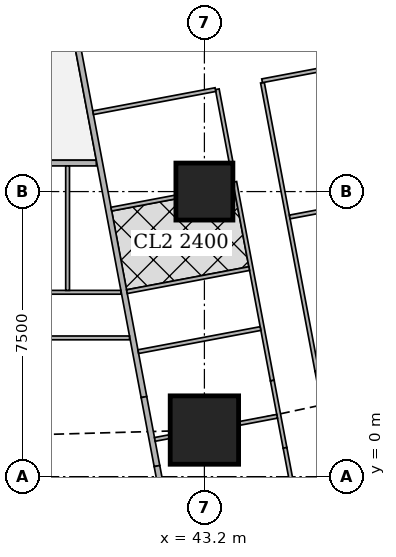
"""IFC4 building model, lengths in metres.
Left out: names, types, materials, properties, quantities, classifications, styles, units other than length and angle.
Written with IfcOpenShell. Run it as: python <this file> out.ifc"""

import sys

from ifc_helpers import new_model, si_unit, direction, frame, frame_2d, origin, origin_2d, place, context, subcontext, project, spatial, rectangle, extrude, element, fill, save


model = new_model("IFC4")
c1 = context("Model", 3, precision=1e-05, world=origin(), true_north=direction((0.0, 1.0)))
c2 = subcontext(c1, "Body", "Model", "MODEL_VIEW")
j1 = project(units=[si_unit("LENGTHUNIT", "METRE"), si_unit("PLANEANGLEUNIT", "RADIAN")], contexts=[c1])
p1 = place(None, origin())
s1 = spatial("IfcSite", under=j1, at=p1, CompositionType="ELEMENT")
p2 = place(p1, origin())
s2 = spatial("IfcBuilding", under=s1, at=p2, CompositionType="ELEMENT")
p3 = place(p2, frame((0.0, 0.0, 147.05)))
s3 = spatial("IfcBuildingStorey", under=s2, at=p3, CompositionType="ELEMENT", Elevation=147.05)
p4 = place(p3, frame((43.2, 1.225, 0.0), z_axis=(0.0, 0.0, 1.0), x_axis=(1.0, 0.0, 0.0)))
e1 = element("IfcColumn", 1, at=p4, inside=s3, PredefinedType="COLUMN", context=c2, shape_type="SweptSolid", body=[
    extrude(rectangle(XDim=1.8, YDim=1.8, at=origin_2d()), origin(), (0.0, 0.0, 1.0), 3.75),
])
p5 = place(p3, frame((43.2, 7.5, 0.0), z_axis=(0.0, 0.0, 1.0), x_axis=(1.0, 0.0, 0.0)))
e2 = element("IfcColumn", 2, at=p5, inside=s3, PredefinedType="COLUMN", context=c2, shape_type="SweptSolid", body=[
    extrude(rectangle(XDim=1.5, YDim=1.5, at=origin_2d()), origin(), (0.0, 0.0, 1.0), 3.75),
])
p6 = place(p3, frame((50.653, 2.703, 0.0), z_axis=(0.0, 0.0, 1.0), x_axis=(-0.185612026696, 0.982623109613, 0.0)))
e3 = element("IfcWall", 3, at=p6, inside=s3, PredefinedType="SOLIDWALL", context=c2, shape_type="SweptSolid", body=[
    extrude(rectangle(XDim=41.393, YDim=0.2, at=frame_2d((20.697, 0.0))), origin(), (0.0, 0.0, 1.0), 3.5),
])
p7 = place(p6, frame((1.633, 0.0, 0.9)))
e4 = element("IfcOpeningElement", 4, at=p7, cuts=e3, PredefinedType="OPENING", context=c2, shape_type="SweptSolid", body=[
    extrude(rectangle(XDim=1.8, YDim=1.5, at=frame_2d((0.9, 0.75))), frame((0.0, 0.11, 0.0), z_axis=(0.0, -1.0, 0.0), x_axis=(1.0, 0.0, 0.0)), (0.0, 0.0, 1.0), 0.22),
])
p8 = place(p6, frame((6.032, 0.0, 0.9)))
e5 = element("IfcOpeningElement", 5, at=p8, cuts=e3, PredefinedType="OPENING", context=c2, shape_type="SweptSolid", body=[
    extrude(rectangle(XDim=1.8, YDim=1.5, at=frame_2d((0.9, 0.75))), frame((0.0, 0.11, 0.0), z_axis=(0.0, -1.0, 0.0), x_axis=(1.0, 0.0, 0.0)), (0.0, 0.0, 1.0), 0.22),
])
p9 = place(p6, frame((9.848, 0.0, 0.9)))
e6 = element("IfcOpeningElement", 6, at=p9, cuts=e3, PredefinedType="OPENING", context=c2, shape_type="SweptSolid", body=[
    extrude(rectangle(XDim=1.8, YDim=1.5, at=frame_2d((0.9, 0.75))), frame((0.0, 0.11, 0.0), z_axis=(0.0, -1.0, 0.0), x_axis=(1.0, 0.0, 0.0)), (0.0, 0.0, 1.0), 0.22),
])
p10 = place(p6, frame((13.664, 0.0, 0.9)))
e7 = element("IfcOpeningElement", 7, at=p10, cuts=e3, PredefinedType="OPENING", context=c2, shape_type="SweptSolid", body=[
    extrude(rectangle(XDim=1.8, YDim=1.5, at=frame_2d((0.9, 0.75))), frame((0.0, 0.11, 0.0), z_axis=(0.0, -1.0, 0.0), x_axis=(1.0, 0.0, 0.0)), (0.0, 0.0, 1.0), 0.22),
])
p11 = place(p6, frame((17.481, 0.0, 0.9)))
e8 = element("IfcOpeningElement", 8, at=p11, cuts=e3, PredefinedType="OPENING", context=c2, shape_type="SweptSolid", body=[
    extrude(rectangle(XDim=1.8, YDim=1.5, at=frame_2d((0.9, 0.75))), frame((0.0, 0.11, 0.0), z_axis=(0.0, -1.0, 0.0), x_axis=(1.0, 0.0, 0.0)), (0.0, 0.0, 1.0), 0.22),
])
p12 = place(p6, frame((21.297, 0.0, 0.9)))
e9 = element("IfcOpeningElement", 9, at=p12, cuts=e3, PredefinedType="OPENING", context=c2, shape_type="SweptSolid", body=[
    extrude(rectangle(XDim=1.8, YDim=1.5, at=frame_2d((0.9, 0.75))), frame((0.0, 0.11, 0.0), z_axis=(0.0, -1.0, 0.0), x_axis=(1.0, 0.0, 0.0)), (0.0, 0.0, 1.0), 0.22),
])
p13 = place(p6, frame((25.113, 0.0, 0.9)))
e10 = element("IfcOpeningElement", 10, at=p13, cuts=e3, PredefinedType="OPENING", context=c2, shape_type="SweptSolid", body=[
    extrude(rectangle(XDim=1.8, YDim=1.5, at=frame_2d((0.9, 0.75))), frame((0.0, 0.11, 0.0), z_axis=(0.0, -1.0, 0.0), x_axis=(1.0, 0.0, 0.0)), (0.0, 0.0, 1.0), 0.22),
])
p14 = place(p6, frame((28.93, 0.0, 0.9)))
e11 = element("IfcOpeningElement", 11, at=p14, cuts=e3, PredefinedType="OPENING", context=c2, shape_type="SweptSolid", body=[
    extrude(rectangle(XDim=1.8, YDim=1.5, at=frame_2d((0.9, 0.75))), frame((0.0, 0.11, 0.0), z_axis=(0.0, -1.0, 0.0), x_axis=(1.0, 0.0, 0.0)), (0.0, 0.0, 1.0), 0.22),
])
p15 = place(p6, frame((32.746, 0.0, 0.9)))
e12 = element("IfcOpeningElement", 12, at=p15, cuts=e3, PredefinedType="OPENING", context=c2, shape_type="SweptSolid", body=[
    extrude(rectangle(XDim=1.8, YDim=1.5, at=frame_2d((0.9, 0.75))), frame((0.0, 0.11, 0.0), z_axis=(0.0, -1.0, 0.0), x_axis=(1.0, 0.0, 0.0)), (0.0, 0.0, 1.0), 0.22),
])
p16 = place(p6, frame((36.481, 0.0, 0.9)))
e13 = element("IfcOpeningElement", 13, at=p16, cuts=e3, PredefinedType="OPENING", context=c2, shape_type="SweptSolid", body=[
    extrude(rectangle(XDim=1.8, YDim=1.5, at=frame_2d((0.9, 0.75))), frame((0.0, 0.11, 0.0), z_axis=(0.0, -1.0, 0.0), x_axis=(1.0, 0.0, 0.0)), (0.0, 0.0, 1.0), 0.22),
])
p17 = place(p3, frame((40.356, 8.25, 0.0), z_axis=(0.0, 0.0, 1.0), x_axis=(-1.0, 0.0, 0.0)))
e14 = element("IfcWall", 14, at=p17, inside=s3, PredefinedType="SOLIDWALL", context=c2, shape_type="SweptSolid", body=[
    extrude(rectangle(XDim=3.605, YDim=0.15, at=frame_2d((1.802, 0.0))), origin(), (0.0, 0.0, 1.0), 3.5),
])
p18 = place(p3, frame((33.877, 43.029, 0.0), z_axis=(0.0, 0.0, 1.0), x_axis=(0.185596841028, -0.98262597798, 0.0)))
e15 = element("IfcWall", 15, at=p18, inside=s3, PredefinedType="SOLIDWALL", context=c2, shape_type="SweptSolid", body=[
    extrude(rectangle(XDim=41.66, YDim=0.15, at=frame_2d((20.83, 0.0))), origin(), (0.0, 0.0, 1.0), 2.5),
])
p19 = place(p18, frame((12.57, 0.0, 0.0)))
e16 = element("IfcOpeningElement", 16, at=p19, cuts=e15, PredefinedType="OPENING", context=c2, shape_type="SweptSolid", body=[
    extrude(rectangle(XDim=1.0, YDim=2.1, at=frame_2d((0.5, 1.05))), frame((0.0, 0.085, 0.0), z_axis=(0.0, -1.0, 0.0), x_axis=(1.0, 0.0, 0.0)), (0.0, 0.0, 1.0), 0.17),
])
p20 = place(p18, frame((16.386, 0.0, 0.0)))
e17 = element("IfcOpeningElement", 17, at=p20, cuts=e15, PredefinedType="OPENING", context=c2, shape_type="SweptSolid", body=[
    extrude(rectangle(XDim=1.0, YDim=2.1, at=frame_2d((0.5, 1.05))), frame((0.0, 0.085, 0.0), z_axis=(0.0, -1.0, 0.0), x_axis=(1.0, 0.0, 0.0)), (0.0, 0.0, 1.0), 0.17),
])
p21 = place(p18, frame((31.166, 0.0, 0.0)))
e18 = element("IfcOpeningElement", 18, at=p21, cuts=e15, PredefinedType="OPENING", context=c2, shape_type="SweptSolid", body=[
    extrude(rectangle(XDim=1.0, YDim=2.1, at=frame_2d((0.5, 1.05))), frame((0.0, 0.085, 0.0), z_axis=(0.0, -1.0, 0.0), x_axis=(1.0, 0.0, 0.0)), (0.0, 0.0, 1.0), 0.17),
])
p22 = place(p3, frame((41.609, 2.093, 0.0), z_axis=(0.0, 0.0, 1.0), x_axis=(0.185708872674, -0.982604811005, 0.0)))
e19 = element("IfcWall", 19, at=p22, inside=s3, PredefinedType="SOLIDWALL", context=c2, shape_type="SweptSolid", body=[
    extrude(rectangle(XDim=1.847, YDim=0.15, at=frame_2d((0.924, 0.0))), origin(), (0.0, 0.0, 1.0), 2.1),
])
p23 = place(p3, frame((41.952, 0.278, 0.0), z_axis=(0.0, 0.0, 1.0), x_axis=(0.185365466984, -0.982669651332, 0.0)))
e20 = element("IfcWall", 20, at=p23, inside=s3, PredefinedType="SOLIDWALL", context=c2, shape_type="SweptSolid", body=[
    extrude(rectangle(XDim=0.944, YDim=0.15, at=frame_2d((0.472, 0.0))), origin(), (0.0, 0.0, 1.0), 3.5),
])
p24 = place(p3, frame((41.229, 3.65, 0.0), z_axis=(0.0, 0.0, 1.0), x_axis=(-1.0, 0.0, 0.0)))
e21 = element("IfcWall", 21, at=p24, inside=s3, PredefinedType="PARTITIONING", context=c2, shape_type="SweptSolid", body=[
    extrude(rectangle(XDim=12.429, YDim=0.1, at=frame_2d((6.214, 0.0))), origin(), (0.0, 0.0, 1.0), 3.5),
])
p25 = place(p24, frame((11.329, 0.0, 0.0)))
e22 = element("IfcOpeningElement", 22, at=p25, cuts=e21, PredefinedType="OPENING", context=c2, shape_type="SweptSolid", body=[
    extrude(rectangle(XDim=0.9, YDim=2.1, at=frame_2d((0.45, 1.05))), frame((0.0, 0.06, 0.0), z_axis=(0.0, -1.0, 0.0), x_axis=(1.0, 0.0, 0.0)), (0.0, 0.0, 1.0), 0.12),
])
p26 = place(p24, frame((7.729, 0.0, 0.0)))
e23 = element("IfcOpeningElement", 23, at=p26, cuts=e21, PredefinedType="OPENING", context=c2, shape_type="SweptSolid", body=[
    extrude(rectangle(XDim=0.9, YDim=2.1, at=frame_2d((0.45, 1.05))), frame((0.0, 0.06, 0.0), z_axis=(0.0, -1.0, 0.0), x_axis=(1.0, 0.0, 0.0)), (0.0, 0.0, 1.0), 0.12),
])
p27 = place(p24, frame((4.129, 0.0, 0.0)))
e24 = element("IfcOpeningElement", 24, at=p27, cuts=e21, PredefinedType="OPENING", context=c2, shape_type="SweptSolid", body=[
    extrude(rectangle(XDim=0.9, YDim=2.1, at=frame_2d((0.45, 1.05))), frame((0.0, 0.06, 0.0), z_axis=(0.0, -1.0, 0.0), x_axis=(1.0, 0.0, 0.0)), (0.0, 0.0, 1.0), 0.12),
])
p28 = place(p3, frame((41.002, 4.85, 0.0), z_axis=(0.0, 0.0, 1.0), x_axis=(-1.0, 0.0, 0.0)))
e25 = element("IfcWall", 25, at=p28, inside=s3, PredefinedType="PARTITIONING", context=c2, shape_type="SweptSolid", body=[
    extrude(rectangle(XDim=12.202, YDim=0.1, at=frame_2d((6.101, 0.0))), origin(), (0.0, 0.0, 1.0), 3.5),
])
p29 = place(p28, frame((10.647, 0.0, 0.0)))
e26 = element("IfcOpeningElement", 26, at=p29, cuts=e25, PredefinedType="OPENING", context=c2, shape_type="SweptSolid", body=[
    extrude(rectangle(XDim=0.9, YDim=2.1, at=frame_2d((0.45, 1.05))), frame((0.0, 0.06, 0.0), z_axis=(0.0, -1.0, 0.0), x_axis=(1.0, 0.0, 0.0)), (0.0, 0.0, 1.0), 0.12),
])
p30 = place(p28, frame((7.352, 0.0, 0.0)))
e27 = element("IfcOpeningElement", 27, at=p30, cuts=e25, PredefinedType="OPENING", context=c2, shape_type="SweptSolid", body=[
    extrude(rectangle(XDim=0.9, YDim=2.1, at=frame_2d((0.45, 1.05))), frame((0.0, 0.06, 0.0), z_axis=(0.0, -1.0, 0.0), x_axis=(1.0, 0.0, 0.0)), (0.0, 0.0, 1.0), 0.12),
])
p31 = place(p28, frame((3.642, 0.0, 0.0)))
e28 = element("IfcOpeningElement", 28, at=p31, cuts=e25, PredefinedType="OPENING", context=c2, shape_type="SweptSolid", body=[
    extrude(rectangle(XDim=0.9, YDim=2.1, at=frame_2d((0.45, 1.05))), frame((0.0, 0.06, 0.0), z_axis=(0.0, -1.0, 0.0), x_axis=(1.0, 0.0, 0.0)), (0.0, 0.0, 1.0), 0.12),
])
p32 = place(p28, frame((0.15, 0.0, 0.0)))
e29 = element("IfcOpeningElement", 29, at=p32, cuts=e25, PredefinedType="OPENING", context=c2, shape_type="SweptSolid", body=[
    extrude(rectangle(XDim=0.9, YDim=2.1, at=frame_2d((0.45, 1.05))), frame((0.0, 0.06, 0.0), z_axis=(0.0, -1.0, 0.0), x_axis=(1.0, 0.0, 0.0)), (0.0, 0.0, 1.0), 0.12),
])
p33 = place(p28, frame((8.847, 0.0, 0.0)))
e30 = element("IfcOpeningElement", 30, at=p33, cuts=e25, PredefinedType="OPENING", context=c2, shape_type="SweptSolid", body=[
    extrude(rectangle(XDim=0.9, YDim=2.1, at=frame_2d((0.45, 1.05))), frame((0.0, 0.06, 0.0), z_axis=(0.0, -1.0, 0.0), x_axis=(1.0, 0.0, 0.0)), (0.0, 0.0, 1.0), 0.12),
])
p34 = place(p28, frame((5.552, 0.0, 0.0)))
e31 = element("IfcOpeningElement", 31, at=p34, cuts=e25, PredefinedType="OPENING", context=c2, shape_type="SweptSolid", body=[
    extrude(rectangle(XDim=0.9, YDim=2.1, at=frame_2d((0.45, 1.05))), frame((0.0, 0.06, 0.0), z_axis=(0.0, -1.0, 0.0), x_axis=(1.0, 0.0, 0.0)), (0.0, 0.0, 1.0), 0.12),
])
p35 = place(p28, frame((1.842, 0.0, 0.0)))
e32 = element("IfcOpeningElement", 32, at=p35, cuts=e25, PredefinedType="OPENING", context=c2, shape_type="SweptSolid", body=[
    extrude(rectangle(XDim=0.9, YDim=2.1, at=frame_2d((0.45, 1.05))), frame((0.0, 0.06, 0.0), z_axis=(0.0, -1.0, 0.0), x_axis=(1.0, 0.0, 0.0)), (0.0, 0.0, 1.0), 0.12),
])
p36 = place(p3, frame((39.6, 4.9, 0.0), z_axis=(0.0, 0.0, 1.0), x_axis=(0.0, 1.0, 0.0)))
e33 = element("IfcWall", 33, at=p36, inside=s3, PredefinedType="PARTITIONING", context=c2, shape_type="SweptSolid", body=[
    extrude(rectangle(XDim=3.275, YDim=0.1, at=frame_2d((1.638, 0.0))), origin(), (0.0, 0.0, 1.0), 3.5),
])
p37 = place(p3, frame((44.727, 10.366, 0.0), z_axis=(0.0, 0.0, 1.0), x_axis=(0.185578957652, -0.982629355595, 0.0)))
e34 = element("IfcWall", 34, at=p37, inside=s3, PredefinedType="PARTITIONING", context=c2, shape_type="SweptSolid", body=[
    extrude(rectangle(XDim=7.721, YDim=0.1, at=frame_2d((3.86, 0.0))), origin(), (0.0, 0.0, 1.0), 3.5),
])
p38 = place(p37, frame((0.151, 0.0, 0.0)))
e35 = element("IfcOpeningElement", 35, at=p38, cuts=e34, PredefinedType="OPENING", context=c2, shape_type="SweptSolid", body=[
    extrude(rectangle(XDim=0.9, YDim=2.1, at=frame_2d((0.45, 1.05))), frame((0.0, 0.06, 0.0), z_axis=(0.0, -1.0, 0.0), x_axis=(1.0, 0.0, 0.0)), (0.0, 0.0, 1.0), 0.12),
])
p39 = place(p37, frame((3.806, 0.0, 0.0)))
e36 = element("IfcOpeningElement", 36, at=p39, cuts=e34, PredefinedType="OPENING", context=c2, shape_type="SweptSolid", body=[
    extrude(rectangle(XDim=0.9, YDim=2.1, at=frame_2d((0.45, 1.05))), frame((0.0, 0.06, 0.0), z_axis=(0.0, -1.0, 0.0), x_axis=(1.0, 0.0, 0.0)), (0.0, 0.0, 1.0), 0.12),
])
p40 = place(p3, frame((46.16, 2.779, 0.0), z_axis=(0.0, 0.0, 1.0), x_axis=(0.18597295662, -0.982554863306, 0.0)))
e37 = element("IfcWall", 37, at=p40, inside=s3, PredefinedType="PARTITIONING", context=c2, shape_type="SweptSolid", body=[
    extrude(rectangle(XDim=1.802, YDim=0.1, at=frame_2d((0.901, 0.0))), origin(), (0.0, 0.0, 1.0), 2.1),
])
p41 = place(p3, frame((43.539, 10.192, 0.0), z_axis=(0.0, 0.0, 1.0), x_axis=(0.18564540894, -0.982616803306, 0.0)))
e38 = element("IfcWall", 38, at=p41, inside=s3, PredefinedType="PARTITIONING", context=c2, shape_type="SweptSolid", body=[
    extrude(rectangle(XDim=1.966, YDim=0.1, at=frame_2d((0.983, 0.0))), origin(), (0.0, 0.0, 1.0), 3.5),
])
p42 = place(p3, frame((43.999, 7.755, 0.0), z_axis=(0.0, 0.0, 1.0), x_axis=(0.185565904578, -0.982631820703, 0.0)))
e39 = element("IfcWall", 39, at=p42, inside=s3, PredefinedType="PARTITIONING", context=c2, shape_type="SweptSolid", body=[
    extrude(rectangle(XDim=5.319, YDim=0.1, at=frame_2d((2.66, 0.0))), origin(), (0.0, 0.0, 1.0), 3.5),
])
p43 = place(p42, frame((1.0, 0.0, 0.0)))
e40 = element("IfcOpeningElement", 40, at=p43, cuts=e39, PredefinedType="OPENING", context=c2, shape_type="SweptSolid", body=[
    extrude(rectangle(XDim=0.9, YDim=2.1, at=frame_2d((0.45, 1.05))), frame((0.0, 0.06, 0.0), z_axis=(0.0, -1.0, 0.0), x_axis=(1.0, 0.0, 0.0)), (0.0, 0.0, 1.0), 0.12),
])
p44 = place(p42, frame((4.269, 0.0, 0.0)))
e41 = element("IfcOpeningElement", 41, at=p44, cuts=e39, PredefinedType="OPENING", context=c2, shape_type="SweptSolid", body=[
    extrude(rectangle(XDim=0.9, YDim=2.1, at=frame_2d((0.45, 1.05))), frame((0.0, 0.06, 0.0), z_axis=(0.0, -1.0, 0.0), x_axis=(1.0, 0.0, 0.0)), (0.0, 0.0, 1.0), 0.12),
])
p45 = place(p42, frame((2.665, 0.0, 0.0)))
e42 = element("IfcOpeningElement", 42, at=p45, cuts=e39, PredefinedType="OPENING", context=c2, shape_type="SweptSolid", body=[
    extrude(rectangle(XDim=0.9, YDim=2.1, at=frame_2d((0.45, 1.05))), frame((0.0, 0.06, 0.0), z_axis=(0.0, -1.0, 0.0), x_axis=(1.0, 0.0, 0.0)), (0.0, 0.0, 1.0), 0.12),
])
p46 = place(p3, frame((44.986, 2.528, 0.0), z_axis=(0.0, 0.0, 1.0), x_axis=(0.18584218627, -0.982579605835, 0.0)))
e43 = element("IfcWall", 43, at=p46, inside=s3, PredefinedType="PARTITIONING", context=c2, shape_type="SweptSolid", body=[
    extrude(rectangle(XDim=1.802, YDim=0.1, at=frame_2d((0.901, 0.0))), origin(), (0.0, 0.0, 1.0), 2.1),
])
p47 = place(p3, frame((45.321, 0.757, 0.0), z_axis=(0.0, 0.0, 1.0), x_axis=(0.185640562635, -0.982617718904, 0.0)))
e44 = element("IfcWall", 44, at=p47, inside=s3, PredefinedType="PARTITIONING", context=c2, shape_type="SweptSolid", body=[
    extrude(rectangle(XDim=1.395, YDim=0.1, at=frame_2d((0.698, 0.0))), origin(), (0.0, 0.0, 1.0), 3.5),
])
p48 = place(p47, frame((0.15, 0.0, 0.0)))
e45 = element("IfcOpeningElement", 45, at=p48, cuts=e44, PredefinedType="OPENING", context=c2, shape_type="SweptSolid", body=[
    extrude(rectangle(XDim=0.9, YDim=2.1, at=frame_2d((0.45, 1.05))), frame((0.0, 0.06, 0.0), z_axis=(0.0, -1.0, 0.0), x_axis=(1.0, 0.0, 0.0)), (0.0, 0.0, 1.0), 0.12),
])
p49 = place(p3, frame((48.943, 11.213, 0.0), z_axis=(0.0, 0.0, 1.0), x_axis=(-0.982633535512, -0.185556823879, 0.0)))
e46 = element("IfcWall", 46, at=p49, inside=s3, PredefinedType="PARTITIONING", context=c2, shape_type="SweptSolid", body=[
    extrude(rectangle(XDim=4.3, YDim=0.1, at=frame_2d((2.15, 0.0))), origin(), (0.0, 0.0, 1.0), 2.1),
])
p50 = place(p3, frame((46.82, 7.091, 0.0), z_axis=(0.0, 0.0, 1.0), x_axis=(-0.982689853246, -0.185258339427, 0.0)))
e47 = element("IfcWall", 47, at=p50, inside=s3, PredefinedType="PARTITIONING", context=c2, shape_type="SweptSolid", body=[
    extrude(rectangle(XDim=1.398, YDim=0.1, at=frame_2d((0.699, 0.0))), origin(), (0.0, 0.0, 1.0), 3.5),
])
p51 = place(p3, frame((43.49, 10.183, 0.0), z_axis=(0.0, 0.0, 1.0), x_axis=(-0.982607026909, -0.185697147715, 0.0)))
e48 = element("IfcWall", 48, at=p51, inside=s3, PredefinedType="PARTITIONING", context=c2, shape_type="SweptSolid", body=[
    extrude(rectangle(XDim=3.275, YDim=0.1, at=frame_2d((1.637, 0.0))), origin(), (0.0, 0.0, 1.0), 3.5),
])
p52 = place(p51, frame((1.2, 0.0, 0.0)))
e49 = element("IfcOpeningElement", 49, at=p52, cuts=e48, PredefinedType="OPENING", context=c2, shape_type="SweptSolid", body=[
    extrude(rectangle(XDim=0.9, YDim=2.1, at=frame_2d((0.45, 1.05))), frame((0.0, 0.06, 0.0), z_axis=(0.0, -1.0, 0.0), x_axis=(1.0, 0.0, 0.0)), (0.0, 0.0, 1.0), 0.12),
])
p53 = place(p3, frame((42.44, 7.357, 0.0), z_axis=(0.0, 0.0, 1.0), x_axis=(-0.982643094077, -0.185506198448, 0.0)))
e50 = element("IfcWall", 50, at=p53, inside=s3, PredefinedType="PARTITIONING", context=c2, shape_type="SweptSolid", body=[
    extrude(rectangle(XDim=1.719, YDim=0.1, at=frame_2d((0.859, 0.0))), origin(), (0.0, 0.0, 1.0), 3.5),
])
p54 = place(p3, frame((45.114, 1.587, 0.0), z_axis=(0.0, 0.0, 1.0), x_axis=(-0.982567886437, -0.185904138047, 0.0)))
e51 = element("IfcWall", 51, at=p54, inside=s3, PredefinedType="PARTITIONING", context=c2, shape_type="SweptSolid", body=[
    extrude(rectangle(XDim=1.022, YDim=0.1, at=frame_2d((0.511, 0.0))), origin(), (0.0, 0.0, 1.0), 2.1),
])
p55 = place(p3, frame((42.29, 1.053, 0.0), z_axis=(0.0, 0.0, 1.0), x_axis=(-0.982830800147, -0.184509127909, 0.0)))
e52 = element("IfcWall", 52, at=p55, inside=s3, PredefinedType="PARTITIONING", context=c2, shape_type="SweptSolid", body=[
    extrude(rectangle(XDim=0.401, YDim=0.1, at=frame_2d((0.2, 0.0))), origin(), (0.0, 0.0, 1.0), 2.1),
])
p56 = place(p3, frame((44.677, 3.896, 0.0), z_axis=(0.0, 0.0, 1.0), x_axis=(-0.982610347627, -0.185679575441, 0.0)))
e53 = element("IfcWall", 53, at=p56, inside=s3, PredefinedType="PARTITIONING", context=c2, shape_type="SweptSolid", body=[
    extrude(rectangle(XDim=3.274, YDim=0.1, at=frame_2d((1.637, 0.0))), origin(), (0.0, 0.0, 1.0), 3.5),
])
p57 = place(p3, frame((44.379, 5.474, 0.0), z_axis=(0.0, 0.0, 1.0), x_axis=(-0.982607026909, -0.185697147715, 0.0)))
e54 = element("IfcWall", 54, at=p57, inside=s3, PredefinedType="PARTITIONING", context=c2, shape_type="SweptSolid", body=[
    extrude(rectangle(XDim=3.275, YDim=0.1, at=frame_2d((1.637, 0.0))), origin(), (0.0, 0.0, 1.0), 3.5),
])
p58 = place(p32, origin())
e55 = element("IfcDoor", 55, at=p58, inside=s3, OperationType="SINGLE_SWING_RIGHT", PredefinedType="DOOR", context=c2, shape_type="SweptSolid", body=[
    extrude(rectangle(XDim=0.9, YDim=2.1, at=frame_2d((0.45, 1.05))), frame((0.0, 0.025, 0.0), z_axis=(0.0, -1.0, 0.0), x_axis=(1.0, 0.0, 0.0)), (0.0, 0.0, 1.0), 0.05),
])
fill(e29, e55)
p59 = place(p38, origin())
e56 = element("IfcDoor", 56, at=p59, inside=s3, OperationType="SINGLE_SWING_LEFT", PredefinedType="DOOR", context=c2, shape_type="SweptSolid", body=[
    extrude(rectangle(XDim=0.9, YDim=2.1, at=frame_2d((0.45, 1.05))), frame((0.0, 0.025, 0.0), z_axis=(0.0, -1.0, 0.0), x_axis=(1.0, 0.0, 0.0)), (0.0, 0.0, 1.0), 0.05),
])
fill(e35, e56)
p60 = place(p39, origin())
e57 = element("IfcDoor", 57, at=p60, inside=s3, OperationType="SINGLE_SWING_LEFT", PredefinedType="DOOR", context=c2, shape_type="SweptSolid", body=[
    extrude(rectangle(XDim=0.9, YDim=2.1, at=frame_2d((0.45, 1.05))), frame((0.0, 0.025, 0.0), z_axis=(0.0, -1.0, 0.0), x_axis=(1.0, 0.0, 0.0)), (0.0, 0.0, 1.0), 0.05),
])
fill(e36, e57)
p61 = place(p43, origin())
e58 = element("IfcDoor", 58, at=p61, inside=s3, OperationType="SINGLE_SWING_LEFT", PredefinedType="DOOR", context=c2, shape_type="SweptSolid", body=[
    extrude(rectangle(XDim=0.9, YDim=2.1, at=frame_2d((0.45, 1.05))), frame((0.0, 0.025, 0.0), z_axis=(0.0, -1.0, 0.0), x_axis=(1.0, 0.0, 0.0)), (0.0, 0.0, 1.0), 0.05),
])
fill(e40, e58)
p62 = place(p44, origin())
e59 = element("IfcDoor", 59, at=p62, inside=s3, OperationType="SINGLE_SWING_LEFT", PredefinedType="DOOR", context=c2, shape_type="SweptSolid", body=[
    extrude(rectangle(XDim=0.9, YDim=2.1, at=frame_2d((0.45, 1.05))), frame((0.0, 0.025, 0.0), z_axis=(0.0, -1.0, 0.0), x_axis=(1.0, 0.0, 0.0)), (0.0, 0.0, 1.0), 0.05),
])
fill(e41, e59)
p63 = place(p48, origin())
e60 = element("IfcDoor", 60, at=p63, inside=s3, OperationType="SINGLE_SWING_RIGHT", PredefinedType="DOOR", context=c2, shape_type="SweptSolid", body=[
    extrude(rectangle(XDim=0.9, YDim=2.1, at=frame_2d((0.45, 1.05))), frame((0.0, 0.025, 0.0), z_axis=(0.0, -1.0, 0.0), x_axis=(1.0, 0.0, 0.0)), (0.0, 0.0, 1.0), 0.05),
])
fill(e45, e60)
p64 = place(p45, origin())
e61 = element("IfcDoor", 61, at=p64, inside=s3, OperationType="SINGLE_SWING_RIGHT", PredefinedType="DOOR", context=c2, shape_type="SweptSolid", body=[
    extrude(rectangle(XDim=0.9, YDim=2.1, at=frame_2d((0.45, 1.05))), frame((0.0, 0.025, 0.0), z_axis=(0.0, -1.0, 0.0), x_axis=(1.0, 0.0, 0.0)), (0.0, 0.0, 1.0), 0.05),
])
fill(e42, e61)
p65 = place(p52, origin())
e62 = element("IfcDoor", 62, at=p65, inside=s3, OperationType="SINGLE_SWING_RIGHT", PredefinedType="DOOR", context=c2, shape_type="SweptSolid", body=[
    extrude(rectangle(XDim=0.9, YDim=2.1, at=frame_2d((0.45, 1.05))), frame((0.0, 0.025, 0.0), z_axis=(0.0, -1.0, 0.0), x_axis=(1.0, 0.0, 0.0)), (0.0, 0.0, 1.0), 0.05),
])
fill(e49, e62)
save(model, sys.argv[1])
